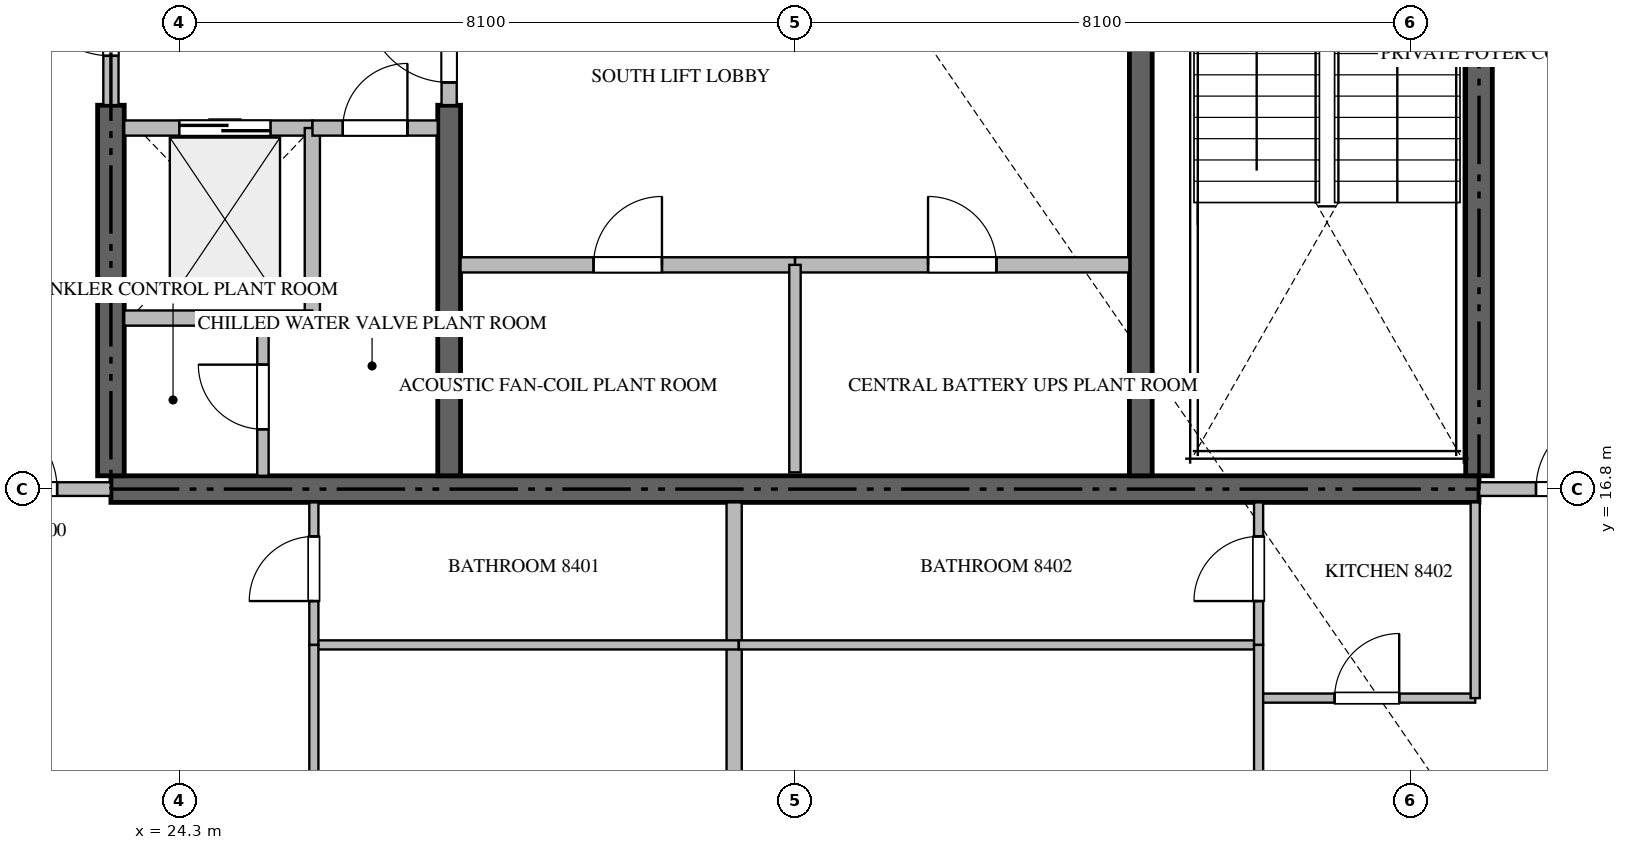
"""IFC4 building model, lengths in metres.
Left out: names, types, materials, properties, quantities, classifications, styles, units other than length and angle.
Written with IfcOpenShell. Run it as: python <this file> out.ifc"""

import sys

from ifc_helpers import new_model, si_unit, direction, frame, frame_2d, origin, place, context, subcontext, project, spatial, rectangle, extrude, source, transform, mapped, element, fill, save


model = new_model("IFC4")
c1 = context("Model", 3, precision=1e-05, world=origin(), true_north=direction((0.0, 1.0)))
c2 = subcontext(c1, "Body", "Model", "MODEL_VIEW")
j1 = project(units=[si_unit("LENGTHUNIT", "METRE"), si_unit("PLANEANGLEUNIT", "RADIAN")], contexts=[c1])
p1 = place(None, origin())
s1 = spatial("IfcSite", under=j1, at=p1, CompositionType="ELEMENT")
p2 = place(p1, origin())
s2 = spatial("IfcBuilding", under=s1, at=p2, CompositionType="ELEMENT")
p3 = place(p2, frame((0.0, 0.0, 338.0)))
s3 = spatial("IfcBuildingStorey", under=s2, at=p3, CompositionType="ELEMENT", Elevation=338.0)
p4 = place(p3, frame((23.4, 16.8, -0.44), z_axis=(0.0, 0.0, 1.0), x_axis=(1.0, 0.0, 0.0)))
e1 = element("IfcWall", 1, at=p4, inside=s3, PredefinedType="SHEAR", context=c2, shape_type="SweptSolid", body=[
    extrude(rectangle(XDim=18.0, YDim=0.35, at=frame_2d((9.0, 0.0))), origin(), (0.0, 0.0, 1.0), 4.228),
])
p5 = place(p3, frame((23.4, 16.975, -0.44), z_axis=(0.0, 0.0, 1.0), x_axis=(0.0, 1.0, 0.0)))
e2 = element("IfcWall", 2, at=p5, inside=s3, PredefinedType="SHEAR", context=c2, shape_type="SweptSolid", body=[
    extrude(rectangle(XDim=4.875, YDim=0.35, at=frame_2d((2.438, 0.0))), origin(), (0.0, 0.0, 1.0), 4.228),
])
p6 = place(p3, frame((41.4, 16.975, -0.44), z_axis=(0.0, 0.0, 1.0), x_axis=(0.0, 1.0, 0.0)))
e3 = element("IfcWall", 3, at=p6, inside=s3, PredefinedType="SHEAR", context=c2, shape_type="SweptSolid", body=[
    extrude(rectangle(XDim=8.375, YDim=0.35, at=frame_2d((4.188, 0.0))), origin(), (0.0, 0.0, 1.0), 4.228),
])
p7 = place(p3, frame((27.85, 16.975, -0.44), z_axis=(0.0, 0.0, 1.0), x_axis=(0.0, 1.0, 0.0)))
e4 = element("IfcWall", 4, at=p7, inside=s3, PredefinedType="SHEAR", context=c2, shape_type="SweptSolid", body=[
    extrude(rectangle(XDim=4.875, YDim=0.3, at=frame_2d((2.438, 0.0))), origin(), (0.0, 0.0, 1.0), 4.228),
])
p8 = place(p3, frame((36.95, 16.975, -0.44), z_axis=(0.0, 0.0, 1.0), x_axis=(0.0, 1.0, 0.0)))
e5 = element("IfcWall", 5, at=p8, inside=s3, PredefinedType="SHEAR", context=c2, shape_type="SweptSolid", body=[
    extrude(rectangle(XDim=8.375, YDim=0.3, at=frame_2d((4.188, 0.0))), origin(), (0.0, 0.0, 1.0), 4.228),
])
p9 = place(p3, frame((23.575, 21.55, 0.0), z_axis=(0.0, 0.0, 1.0), x_axis=(1.0, 0.0, 0.0)))
e6 = element("IfcWall", 6, at=p9, inside=s3, PredefinedType="STANDARD", context=c2, shape_type="SweptSolid", body=[
    extrude(rectangle(XDim=2.475, YDim=0.2, at=frame_2d((1.238, 0.0))), origin(), (0.0, 0.0, 1.0), 3.79),
])
p10 = place(p9, frame((0.725, 0.0, 0.0)))
e7 = element("IfcOpeningElement", 7, at=p10, cuts=e6, PredefinedType="OPENING", context=c2, shape_type="SweptSolid", body=[
    extrude(rectangle(XDim=1.2, YDim=2.2, at=frame_2d((0.6, 1.1))), frame((0.0, 0.11, 0.0), z_axis=(0.0, -1.0, 0.0), x_axis=(1.0, 0.0, 0.0)), (0.0, 0.0, 1.0), 0.22),
])
p11 = place(p3, frame((26.05, 19.05, 0.0), z_axis=(0.0, 0.0, 1.0), x_axis=(0.0, 1.0, 0.0)))
e8 = element("IfcWall", 8, at=p11, inside=s3, PredefinedType="STANDARD", context=c2, shape_type="SweptSolid", body=[
    extrude(rectangle(XDim=2.5, YDim=0.2, at=frame_2d((1.25, 0.0))), origin(), (0.0, 0.0, 1.0), 3.79),
])
p12 = place(p3, frame((23.575, 19.05, 0.0), z_axis=(0.0, 0.0, 1.0), x_axis=(1.0, 0.0, 0.0)))
e9 = element("IfcWall", 9, at=p12, inside=s3, PredefinedType="STANDARD", context=c2, shape_type="SweptSolid", body=[
    extrude(rectangle(XDim=2.475, YDim=0.2, at=frame_2d((1.238, 0.0))), origin(), (0.0, 0.0, 1.0), 3.79),
])
p13 = place(p3, frame((26.052, 21.55, 0.0), z_axis=(0.0, 0.0, 1.0), x_axis=(1.0, 0.0, 0.0)))
e10 = element("IfcWall", 10, at=p13, inside=s3, PredefinedType="STANDARD", context=c2, shape_type="SweptSolid", body=[
    extrude(rectangle(XDim=1.648, YDim=0.2, at=frame_2d((0.824, 0.0))), origin(), (0.0, 0.0, 1.0), 3.79),
])
p14 = place(p13, frame((0.399, 0.0, 0.0)))
e11 = element("IfcOpeningElement", 11, at=p14, cuts=e10, PredefinedType="OPENING", context=c2, shape_type="SweptSolid", body=[
    extrude(rectangle(XDim=0.85, YDim=2.1, at=frame_2d((0.425, 1.05))), frame((0.0, 0.11, 0.0), z_axis=(0.0, -1.0, 0.0), x_axis=(1.0, 0.0, 0.0)), (0.0, 0.0, 1.0), 0.22),
])
p15 = place(p3, frame((23.4, 21.852, 0.0), z_axis=(0.0, 0.0, 1.0), x_axis=(0.0, 1.0, 0.0)))
e12 = element("IfcWall", 12, at=p15, inside=s3, PredefinedType="STANDARD", context=c2, shape_type="SweptSolid", body=[
    extrude(rectangle(XDim=2.396, YDim=0.2, at=frame_2d((1.198, 0.0))), origin(), (0.0, 0.0, 1.0), 3.79),
])
p16 = place(p15, frame((0.648, 0.0, 0.0)))
e13 = element("IfcOpeningElement", 13, at=p16, cuts=e12, PredefinedType="OPENING", context=c2, shape_type="SweptSolid", body=[
    extrude(rectangle(XDim=1.1, YDim=2.15, at=frame_2d((0.55, 1.075))), frame((0.0, 0.11, 0.0), z_axis=(0.0, -1.0, 0.0), x_axis=(1.0, 0.0, 0.0)), (0.0, 0.0, 1.0), 0.22),
])
p17 = place(p3, frame((27.85, 21.852, 0.0), z_axis=(0.0, 0.0, 1.0), x_axis=(0.0, 1.0, 0.0)))
e14 = element("IfcWall", 14, at=p17, inside=s3, PredefinedType="STANDARD", context=c2, shape_type="SweptSolid", body=[
    extrude(rectangle(XDim=1.696, YDim=0.2, at=frame_2d((0.848, 0.0))), origin(), (0.0, 0.0, 1.0), 3.79),
])
p18 = place(p17, frame((0.298, 0.0, 0.0)))
e15 = element("IfcOpeningElement", 15, at=p18, cuts=e14, PredefinedType="OPENING", context=c2, shape_type="SweptSolid", body=[
    extrude(rectangle(XDim=1.1, YDim=2.15, at=frame_2d((0.55, 1.075))), frame((0.0, 0.11, 0.0), z_axis=(0.0, -1.0, 0.0), x_axis=(1.0, 0.0, 0.0)), (0.0, 0.0, 1.0), 0.22),
])
p19 = place(p3, frame((25.4, 16.975, 0.0), z_axis=(0.0, 0.0, 1.0), x_axis=(0.0, 1.0, 0.0)))
e16 = element("IfcWall", 16, at=p19, inside=s3, PredefinedType="PARTITIONING", context=c2, shape_type="SweptSolid", body=[
    extrude(rectangle(XDim=2.075, YDim=0.15, at=frame_2d((1.038, 0.0))), origin(), (0.0, 0.0, 1.0), 3.79),
])
p20 = place(p19, frame((0.612, 0.0, 0.0)))
e17 = element("IfcOpeningElement", 17, at=p20, cuts=e16, PredefinedType="OPENING", context=c2, shape_type="SweptSolid", body=[
    extrude(rectangle(XDim=0.85, YDim=2.1, at=frame_2d((0.425, 1.05))), frame((0.0, 0.085, 0.0), z_axis=(0.0, -1.0, 0.0), x_axis=(1.0, 0.0, 0.0)), (0.0, 0.0, 1.0), 0.17),
])
p21 = place(p3, frame((28.0, 19.75, 0.0), z_axis=(0.0, 0.0, 1.0), x_axis=(1.0, 0.0, 0.0)))
e18 = element("IfcWall", 18, at=p21, inside=s3, PredefinedType="STANDARD", context=c2, shape_type="SweptSolid", body=[
    extrude(rectangle(XDim=4.4, YDim=0.2, at=frame_2d((2.2, 0.0))), origin(), (0.0, 0.0, 1.0), 3.79),
])
p22 = place(p21, frame((1.75, 0.0, 0.0)))
e19 = element("IfcOpeningElement", 19, at=p22, cuts=e18, PredefinedType="OPENING", context=c2, shape_type="SweptSolid", body=[
    extrude(rectangle(XDim=0.9, YDim=2.1, at=frame_2d((0.45, 1.05))), frame((0.0, 0.11, 0.0), z_axis=(0.0, -1.0, 0.0), x_axis=(1.0, 0.0, 0.0)), (0.0, 0.0, 1.0), 0.22),
])
p23 = place(p3, frame((32.402, 19.75, 0.0), z_axis=(0.0, 0.0, 1.0), x_axis=(1.0, 0.0, 0.0)))
e20 = element("IfcWall", 20, at=p23, inside=s3, PredefinedType="STANDARD", context=c2, shape_type="SweptSolid", body=[
    extrude(rectangle(XDim=4.398, YDim=0.2, at=frame_2d((2.199, 0.0))), origin(), (0.0, 0.0, 1.0), 3.79),
])
p24 = place(p23, frame((1.749, 0.0, 0.0)))
e21 = element("IfcOpeningElement", 21, at=p24, cuts=e20, PredefinedType="OPENING", context=c2, shape_type="SweptSolid", body=[
    extrude(rectangle(XDim=0.9, YDim=2.1, at=frame_2d((0.45, 1.05))), frame((0.0, 0.11, 0.0), z_axis=(0.0, -1.0, 0.0), x_axis=(1.0, 0.0, 0.0)), (0.0, 0.0, 1.0), 0.22),
])
p25 = place(p3, frame((32.4, 17.02, 0.0), z_axis=(0.0, 0.0, 1.0), x_axis=(0.0, 1.0, 0.0)))
e22 = element("IfcWall", 22, at=p25, inside=s3, PredefinedType="PARTITIONING", context=c2, shape_type="SweptSolid", body=[
    extrude(rectangle(XDim=2.73, YDim=0.15, at=frame_2d((1.365, 0.0))), origin(), (0.0, 0.0, 1.0), 3.79),
])
p26 = place(p3, frame((31.6, 4.082, 0.0), z_axis=(0.0, 0.0, 1.0), x_axis=(0.0, 1.0, 0.0)))
e23 = element("IfcWall", 23, at=p26, inside=s3, PredefinedType="PARTITIONING", context=c2, shape_type="SweptSolid", body=[
    extrude(rectangle(XDim=12.543, YDim=0.2, at=frame_2d((6.271, 0.0))), origin(), (0.0, 0.0, 1.0), 3.79),
])
p27 = place(p3, frame((20.902, 16.8, 0.0), z_axis=(0.0, 0.0, 1.0), x_axis=(1.0, 0.0, 0.0)))
e24 = element("IfcWall", 24, at=p27, inside=s3, PredefinedType="PARTITIONING", context=c2, shape_type="SweptSolid", body=[
    extrude(rectangle(XDim=2.496, YDim=0.18, at=frame_2d((1.248, 0.0))), origin(), (0.0, 0.0, 1.0), 3.79),
])
p28 = place(p27, frame((0.79, 0.0, 0.0)))
e25 = element("IfcOpeningElement", 25, at=p28, cuts=e24, PredefinedType="OPENING", context=c2, shape_type="SweptSolid", body=[
    extrude(rectangle(XDim=1.0, YDim=2.15, at=frame_2d((0.5, 1.075))), frame((0.0, 0.1, 0.0), z_axis=(0.0, -1.0, 0.0), x_axis=(1.0, 0.0, 0.0)), (0.0, 0.0, 1.0), 0.2),
])
p29 = place(p3, frame((41.402, 16.8, 0.0), z_axis=(0.0, 0.0, 1.0), x_axis=(1.0, 0.0, 0.0)))
e26 = element("IfcWall", 26, at=p29, inside=s3, PredefinedType="PARTITIONING", context=c2, shape_type="SweptSolid", body=[
    extrude(rectangle(XDim=2.496, YDim=0.18, at=frame_2d((1.248, 0.0))), origin(), (0.0, 0.0, 1.0), 3.79),
])
p30 = place(p29, frame((0.748, 0.0, 0.0)))
e27 = element("IfcOpeningElement", 27, at=p30, cuts=e26, PredefinedType="OPENING", context=c2, shape_type="SweptSolid", body=[
    extrude(rectangle(XDim=1.0, YDim=2.15, at=frame_2d((0.5, 1.075))), frame((0.0, 0.1, 0.0), z_axis=(0.0, -1.0, 0.0), x_axis=(1.0, 0.0, 0.0)), (0.0, 0.0, 1.0), 0.2),
])
p31 = place(p3, frame((26.07, 14.75, 0.0), z_axis=(0.0, 0.0, 1.0), x_axis=(1.0, 0.0, 0.0)))
e28 = element("IfcWall", 28, at=p31, inside=s3, PredefinedType="PARTITIONING", context=c2, shape_type="SweptSolid", body=[
    extrude(rectangle(XDim=5.59, YDim=0.12, at=frame_2d((2.795, 0.0))), origin(), (0.0, 0.0, 1.0), 3.79),
])
p32 = place(p3, frame((26.07, 9.579, 0.0), z_axis=(0.0, 0.0, 1.0), x_axis=(0.0, 1.0, 0.0)))
e29 = element("IfcWall", 29, at=p32, inside=s3, PredefinedType="PARTITIONING", context=c2, shape_type="SweptSolid", body=[
    extrude(rectangle(XDim=5.171, YDim=0.12, at=frame_2d((2.585, 0.0))), origin(), (0.0, 0.0, 1.0), 3.79),
])
p33 = place(p32, frame((2.16, 0.0, 0.0)))
e30 = element("IfcOpeningElement", 30, at=p33, cuts=e29, PredefinedType="OPENING", context=c2, shape_type="SweptSolid", body=[
    extrude(rectangle(XDim=0.85, YDim=2.1, at=frame_2d((0.425, 1.05))), frame((0.0, 0.07, 0.0), z_axis=(0.0, -1.0, 0.0), x_axis=(1.0, 0.0, 0.0)), (0.0, 0.0, 1.0), 0.14),
])
p34 = place(p3, frame((26.07, 14.752, 0.0), z_axis=(0.0, 0.0, 1.0), x_axis=(0.0, 1.0, 0.0)))
e31 = element("IfcWall", 31, at=p34, inside=s3, PredefinedType="PARTITIONING", context=c2, shape_type="SweptSolid", body=[
    extrude(rectangle(XDim=1.873, YDim=0.12, at=frame_2d((0.937, 0.0))), origin(), (0.0, 0.0, 1.0), 3.79),
])
p35 = place(p34, frame((0.575, 0.0, 0.0)))
e32 = element("IfcOpeningElement", 32, at=p35, cuts=e31, PredefinedType="OPENING", context=c2, shape_type="SweptSolid", body=[
    extrude(rectangle(XDim=0.85, YDim=2.1, at=frame_2d((0.425, 1.05))), frame((0.0, 0.07, 0.0), z_axis=(0.0, -1.0, 0.0), x_axis=(1.0, 0.0, 0.0)), (0.0, 0.0, 1.0), 0.14),
])
p36 = place(p3, frame((38.5, 14.05, 0.0), z_axis=(0.0, 0.0, 1.0), x_axis=(1.0, 0.0, 0.0)))
e33 = element("IfcWall", 33, at=p36, inside=s3, PredefinedType="PARTITIONING", context=c2, shape_type="SweptSolid", body=[
    extrude(rectangle(XDim=2.85, YDim=0.12, at=frame_2d((1.425, 0.0))), origin(), (0.0, 0.0, 1.0), 3.79),
])
p37 = place(p36, frame((1.0, 0.0, 0.0)))
e34 = element("IfcOpeningElement", 34, at=p37, cuts=e33, PredefinedType="OPENING", context=c2, shape_type="SweptSolid", body=[
    extrude(rectangle(XDim=0.85, YDim=2.1, at=frame_2d((0.425, 1.05))), frame((0.0, 0.07, 0.0), z_axis=(0.0, -1.0, 0.0), x_axis=(1.0, 0.0, 0.0)), (0.0, 0.0, 1.0), 0.14),
])
p38 = place(p3, frame((41.35, 14.05, 0.0), z_axis=(0.0, 0.0, 1.0), x_axis=(0.0, 1.0, 0.0)))
e35 = element("IfcWall", 35, at=p38, inside=s3, PredefinedType="PARTITIONING", context=c2, shape_type="SweptSolid", body=[
    extrude(rectangle(XDim=2.575, YDim=0.12, at=frame_2d((1.288, 0.0))), origin(), (0.0, 0.0, 1.0), 3.79),
])
p39 = place(p3, frame((31.662, 14.75, 0.0), z_axis=(0.0, 0.0, 1.0), x_axis=(1.0, 0.0, 0.0)))
e36 = element("IfcWall", 36, at=p39, inside=s3, PredefinedType="PARTITIONING", context=c2, shape_type="SweptSolid", body=[
    extrude(rectangle(XDim=6.838, YDim=0.12, at=frame_2d((3.419, 0.0))), origin(), (0.0, 0.0, 1.0), 3.79),
])
p40 = place(p3, frame((38.5, 10.246, 0.0), z_axis=(0.0, 0.0, 1.0), x_axis=(0.0, 1.0, 0.0)))
e37 = element("IfcWall", 37, at=p40, inside=s3, PredefinedType="PARTITIONING", context=c2, shape_type="SweptSolid", body=[
    extrude(rectangle(XDim=4.504, YDim=0.12, at=frame_2d((2.252, 0.0))), origin(), (0.0, 0.0, 1.0), 3.79),
])
p41 = place(p40, frame((1.827, 0.0, 0.0)))
e38 = element("IfcOpeningElement", 38, at=p41, cuts=e37, PredefinedType="OPENING", context=c2, shape_type="SweptSolid", body=[
    extrude(rectangle(XDim=0.85, YDim=2.1, at=frame_2d((0.425, 1.05))), frame((0.0, 0.07, 0.0), z_axis=(0.0, -1.0, 0.0), x_axis=(1.0, 0.0, 0.0)), (0.0, 0.0, 1.0), 0.14),
])
p42 = place(p3, frame((38.5, 14.752, 0.0), z_axis=(0.0, 0.0, 1.0), x_axis=(0.0, 1.0, 0.0)))
e39 = element("IfcWall", 39, at=p42, inside=s3, PredefinedType="PARTITIONING", context=c2, shape_type="SweptSolid", body=[
    extrude(rectangle(XDim=1.873, YDim=0.12, at=frame_2d((0.937, 0.0))), origin(), (0.0, 0.0, 1.0), 3.79),
])
p43 = place(p42, frame((0.575, 0.0, 0.0)))
e40 = element("IfcOpeningElement", 40, at=p43, cuts=e39, PredefinedType="OPENING", context=c2, shape_type="SweptSolid", body=[
    extrude(rectangle(XDim=0.85, YDim=2.1, at=frame_2d((0.425, 1.05))), frame((0.0, 0.07, 0.0), z_axis=(0.0, -1.0, 0.0), x_axis=(1.0, 0.0, 0.0)), (0.0, 0.0, 1.0), 0.14),
])
m1 = source(origin(), c2, "Body", "SweptSolid", [
    extrude(rectangle(XDim=1.2, YDim=2.2, at=frame_2d((0.6, 1.1))), frame((0.0, 0.025, 0.0), z_axis=(0.0, -1.0, 0.0), x_axis=(1.0, 0.0, 0.0)), (0.0, 0.0, 1.0), 0.05),
])
p44 = place(p10, origin())
e41 = element("IfcDoor", 41, at=p44, inside=s3, OperationType="DOUBLE_DOOR_SLIDING", PredefinedType="DOOR", context=c2, shape_type="MappedRepresentation", body=[
    mapped(m1, transform((0.0, 0.0, 0.0), scale=1.0)),
])
fill(e7, e41)
m2 = source(origin(), c2, "Body", "SweptSolid", [
    extrude(rectangle(XDim=0.85, YDim=2.1, at=frame_2d((0.425, 1.05))), frame((0.0, 0.025, 0.0), z_axis=(0.0, -1.0, 0.0), x_axis=(1.0, 0.0, 0.0)), (0.0, 0.0, 1.0), 0.05),
])
p45 = place(p14, origin())
e42 = element("IfcDoor", 42, at=p45, inside=s3, OperationType="SINGLE_SWING_RIGHT", PredefinedType="DOOR", context=c2, shape_type="MappedRepresentation", body=[
    mapped(m2, transform((0.0, 0.0, 0.0), scale=1.0)),
])
fill(e11, e42)
m3 = source(origin(), c2, "Body", "SweptSolid", [
    extrude(rectangle(XDim=1.1, YDim=2.15, at=frame_2d((0.55, 1.075))), frame((0.0, 0.025, 0.0), z_axis=(0.0, -1.0, 0.0), x_axis=(1.0, 0.0, 0.0)), (0.0, 0.0, 1.0), 0.05),
])
p46 = place(p16, origin())
e43 = element("IfcDoor", 43, at=p46, inside=s3, OperationType="SINGLE_SWING_RIGHT", PredefinedType="DOOR", context=c2, shape_type="MappedRepresentation", body=[
    mapped(m3, transform((0.0, 0.0, 0.0), scale=1.0)),
])
fill(e13, e43)
p47 = place(p18, origin())
e44 = element("IfcDoor", 44, at=p47, inside=s3, OperationType="SINGLE_SWING_RIGHT", PredefinedType="DOOR", context=c2, shape_type="MappedRepresentation", body=[
    mapped(m3, transform((0.0, 0.0, 0.0), scale=1.0)),
])
fill(e15, e44)
p48 = place(p20, origin())
e45 = element("IfcDoor", 45, at=p48, inside=s3, OperationType="SINGLE_SWING_RIGHT", PredefinedType="DOOR", context=c2, shape_type="MappedRepresentation", body=[
    mapped(m2, transform((0.0, 0.0, 0.0), scale=1.0)),
])
fill(e17, e45)
m4 = source(origin(), c2, "Body", "SweptSolid", [
    extrude(rectangle(XDim=0.9, YDim=2.1, at=frame_2d((0.45, 1.05))), frame((0.0, 0.025, 0.0), z_axis=(0.0, -1.0, 0.0), x_axis=(1.0, 0.0, 0.0)), (0.0, 0.0, 1.0), 0.05),
])
p49 = place(p22, origin())
e46 = element("IfcDoor", 46, at=p49, inside=s3, OperationType="SINGLE_SWING_RIGHT", PredefinedType="DOOR", context=c2, shape_type="MappedRepresentation", body=[
    mapped(m4, transform((0.0, 0.0, 0.0), scale=1.0)),
])
fill(e19, e46)
p50 = place(p24, origin())
e47 = element("IfcDoor", 47, at=p50, inside=s3, OperationType="SINGLE_SWING_LEFT", PredefinedType="DOOR", context=c2, shape_type="MappedRepresentation", body=[
    mapped(m4, transform((0.0, 0.0, 0.0), scale=1.0)),
])
fill(e21, e47)
m5 = source(origin(), c2, "Body", "SweptSolid", [
    extrude(rectangle(XDim=1.0, YDim=2.15, at=frame_2d((0.5, 1.075))), frame((0.0, 0.025, 0.0), z_axis=(0.0, -1.0, 0.0), x_axis=(1.0, 0.0, 0.0)), (0.0, 0.0, 1.0), 0.05),
])
p51 = place(p28, origin())
e48 = element("IfcDoor", 48, at=p51, inside=s3, OperationType="SINGLE_SWING_LEFT", PredefinedType="DOOR", context=c2, shape_type="MappedRepresentation", body=[
    mapped(m5, transform((0.0, 0.0, 0.0), scale=1.0)),
])
fill(e25, e48)
p52 = place(p30, origin())
e49 = element("IfcDoor", 49, at=p52, inside=s3, OperationType="SINGLE_SWING_RIGHT", PredefinedType="DOOR", context=c2, shape_type="MappedRepresentation", body=[
    mapped(m5, transform((0.0, 0.0, 0.0), scale=1.0)),
])
fill(e27, e49)
p53 = place(p35, origin())
e50 = element("IfcDoor", 50, at=p53, inside=s3, OperationType="SINGLE_SWING_LEFT", PredefinedType="DOOR", context=c2, shape_type="MappedRepresentation", body=[
    mapped(m2, transform((0.0, 0.0, 0.0), scale=1.0)),
])
fill(e32, e50)
p54 = place(p37, origin())
e51 = element("IfcDoor", 51, at=p54, inside=s3, OperationType="SINGLE_SWING_RIGHT", PredefinedType="DOOR", context=c2, shape_type="MappedRepresentation", body=[
    mapped(m2, transform((0.0, 0.0, 0.0), scale=1.0)),
])
fill(e34, e51)
p55 = place(p43, origin())
e52 = element("IfcDoor", 52, at=p55, inside=s3, OperationType="SINGLE_SWING_LEFT", PredefinedType="DOOR", context=c2, shape_type="MappedRepresentation", body=[
    mapped(m2, transform((0.0, 0.0, 0.0), scale=1.0)),
])
fill(e40, e52)
save(model, sys.argv[1])
